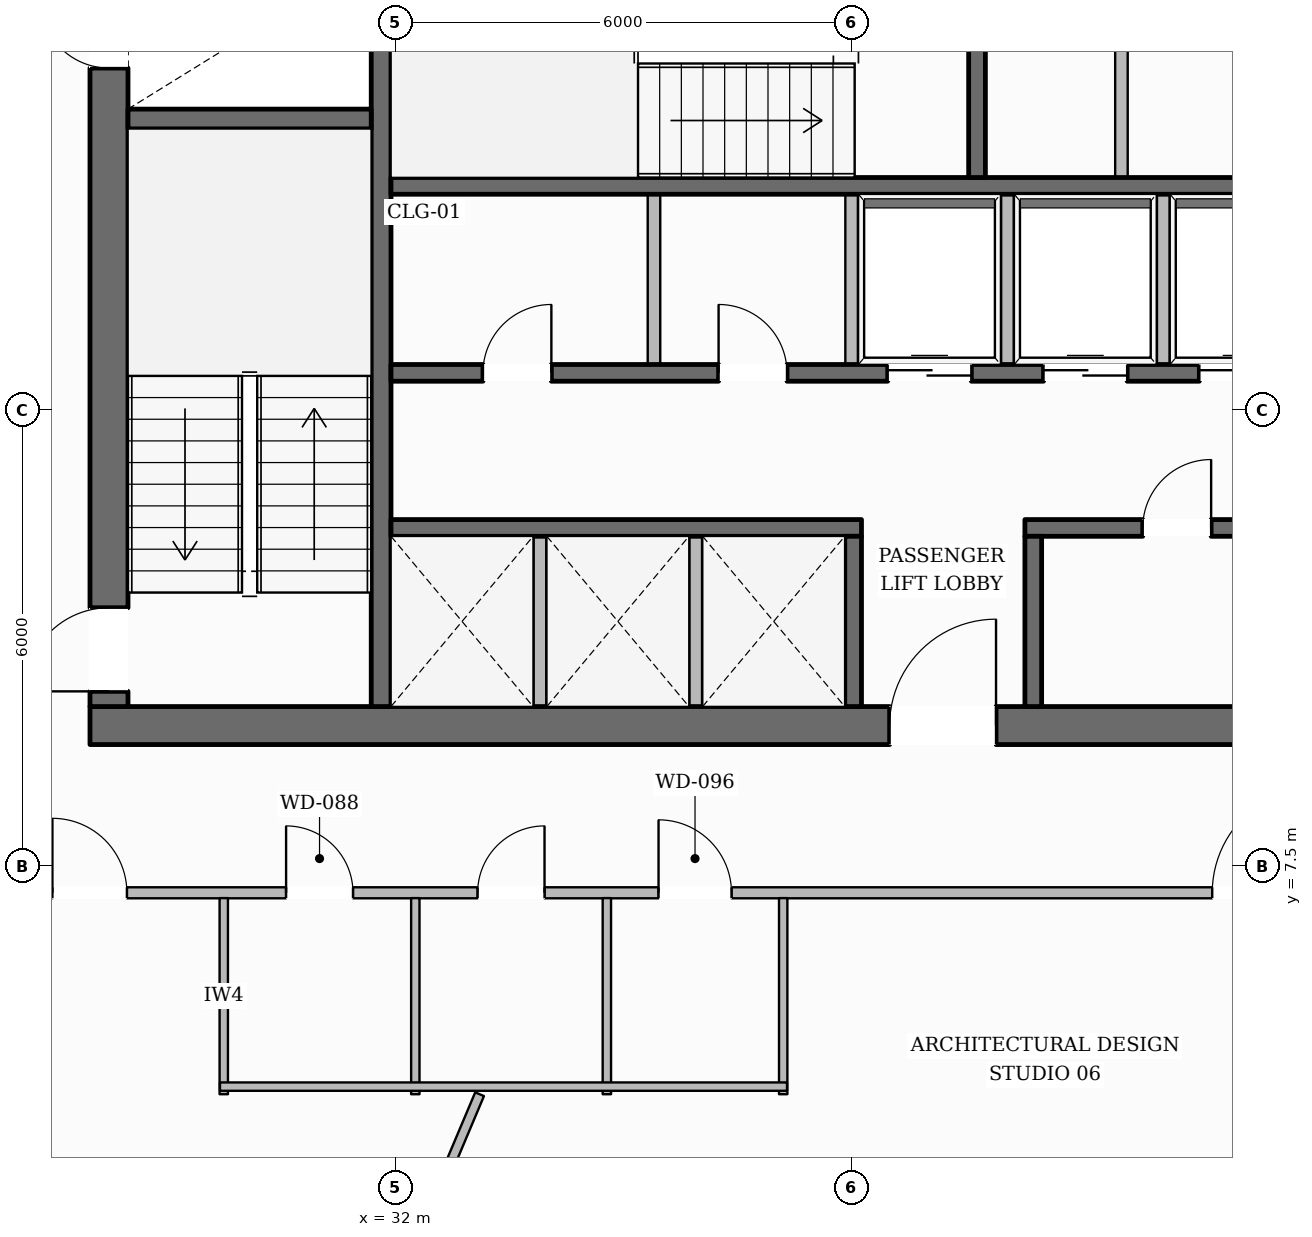
"""IFC4 building model, lengths in metres.
Left out: names, types, materials, properties, quantities, classifications, styles, units other than length and angle.
Written with IfcOpenShell. Run it as: python <this file> out.ifc"""

import sys

from ifc_helpers import new_model, si_unit, direction, frame, frame_2d, origin, place, context, subcontext, project, spatial, rectangle, extrude, element, fill, save


model = new_model("IFC4")
c1 = context("Model", 3, precision=1e-05, world=origin(), true_north=direction((0.0, 1.0)))
c2 = subcontext(c1, "Body", "Model", "MODEL_VIEW")
j1 = project(units=[si_unit("LENGTHUNIT", "METRE"), si_unit("PLANEANGLEUNIT", "RADIAN")], contexts=[c1])
p1 = place(None, origin())
s1 = spatial("IfcSite", under=j1, at=p1, CompositionType="ELEMENT")
p2 = place(p1, origin())
s2 = spatial("IfcBuilding", under=s1, at=p2, CompositionType="ELEMENT")
p3 = place(p2, frame((0.0, 0.0, 100.9)))
s3 = spatial("IfcBuildingStorey", under=s2, at=p3, CompositionType="ELEMENT", Elevation=100.9)
p4 = place(p3, frame((27.98, 9.35, 0.0), z_axis=(0.0, 0.0, 1.0), x_axis=(1.0, 0.0, 0.0)))
e1 = element("IfcWall", 1, at=p4, inside=s3, PredefinedType="SOLIDWALL", context=c2, shape_type="SweptSolid", body=[
    extrude(rectangle(XDim=20.04, YDim=0.5, at=frame_2d((10.02, 0.0))), origin(), (0.0, 0.0, 1.0), 3.6),
])
p5 = place(p4, frame((10.52, 0.0, 0.0)))
e2 = element("IfcOpeningElement", 2, at=p5, cuts=e1, PredefinedType="OPENING", context=c2, shape_type="SweptSolid", body=[
    extrude(rectangle(XDim=1.4, YDim=2.2, at=frame_2d((0.7, 1.1))), frame((0.0, 0.26, 0.0), z_axis=(0.0, -1.0, 0.0), x_axis=(1.0, 0.0, 0.0)), (0.0, 0.0, 1.0), 0.52),
])
p6 = place(p3, frame((28.23, 9.6, 0.0), z_axis=(0.0, 0.0, 1.0), x_axis=(0.0, 1.0, 0.0)))
e3 = element("IfcWall", 3, at=p6, inside=s3, PredefinedType="SOLIDWALL", context=c2, shape_type="SweptSolid", body=[
    extrude(rectangle(XDim=13.0, YDim=0.5, at=frame_2d((6.5, 0.0))), origin(), (0.0, 0.0, 1.0), 3.6),
])
p7 = place(p6, frame((0.2, 0.0, 0.0)))
e4 = element("IfcOpeningElement", 4, at=p7, cuts=e3, PredefinedType="OPENING", context=c2, shape_type="SweptSolid", body=[
    extrude(rectangle(XDim=1.1, YDim=2.15, at=frame_2d((0.55, 1.075))), frame((0.0, 0.26, 0.0), z_axis=(0.0, -1.0, 0.0), x_axis=(1.0, 0.0, 0.0)), (0.0, 0.0, 1.0), 0.52),
])
p8 = place(p6, frame((8.4, 0.0, 0.0)))
e5 = element("IfcOpeningElement", 5, at=p8, cuts=e3, PredefinedType="OPENING", context=c2, shape_type="SweptSolid", body=[
    extrude(rectangle(XDim=0.9, YDim=2.1, at=frame_2d((0.45, 1.05))), frame((0.0, 0.26, 0.0), z_axis=(0.0, -1.0, 0.0), x_axis=(1.0, 0.0, 0.0)), (0.0, 0.0, 1.0), 0.52),
])
p9 = place(p3, frame((31.81, 9.6, 0.0), z_axis=(0.0, 0.0, 1.0), x_axis=(0.0, 1.0, 0.0)))
e6 = element("IfcWall", 6, at=p9, inside=s3, PredefinedType="SHEAR", context=c2, shape_type="SweptSolid", body=[
    extrude(rectangle(XDim=13.0, YDim=0.26, at=frame_2d((6.5, 0.0))), origin(), (0.0, 0.0, 1.0), 3.6),
])
p10 = place(p9, frame((10.925, 0.0, 0.0)))
e7 = element("IfcOpeningElement", 7, at=p10, cuts=e6, PredefinedType="OPENING", context=c2, shape_type="SweptSolid", body=[
    extrude(rectangle(XDim=1.25, YDim=2.25, at=frame_2d((0.625, 1.125))), frame((0.0, 0.14, 0.0), z_axis=(0.0, -1.0, 0.0), x_axis=(1.0, 0.0, 0.0)), (0.0, 0.0, 1.0), 0.28),
])
p11 = place(p3, frame((28.48, 17.33, 0.0), z_axis=(0.0, 0.0, 1.0), x_axis=(1.0, 0.0, 0.0)))
e8 = element("IfcWall", 8, at=p11, inside=s3, PredefinedType="SHEAR", context=c2, shape_type="SweptSolid", body=[
    extrude(rectangle(XDim=3.2, YDim=0.26, at=frame_2d((1.6, 0.0))), origin(), (0.0, 0.0, 1.0), 3.6),
])
p12 = place(p3, frame((31.94, 16.45, 0.0), z_axis=(0.0, 0.0, 1.0), x_axis=(1.0, 0.0, 0.0)))
e9 = element("IfcWall", 9, at=p12, inside=s3, PredefinedType="SOLIDWALL", context=c2, shape_type="SweptSolid", body=[
    extrude(rectangle(XDim=12.12, YDim=0.22, at=frame_2d((6.06, 0.0))), origin(), (0.0, 0.0, 1.0), 3.6),
])
p13 = place(p3, frame((39.65, 16.56, 0.0), z_axis=(0.0, 0.0, 1.0), x_axis=(0.0, 1.0, 0.0)))
e10 = element("IfcWall", 10, at=p13, inside=s3, PredefinedType="SOLIDWALL", context=c2, shape_type="SweptSolid", body=[
    extrude(rectangle(XDim=3.2, YDim=0.22, at=frame_2d((1.6, 0.0))), origin(), (0.0, 0.0, 1.0), 3.6),
])
p14 = place(p3, frame((31.94, 13.99, 0.0), z_axis=(0.0, 0.0, 1.0), x_axis=(1.0, 0.0, 0.0)))
e11 = element("IfcWall", 11, at=p14, inside=s3, PredefinedType="SOLIDWALL", context=c2, shape_type="SweptSolid", body=[
    extrude(rectangle(XDim=12.12, YDim=0.22, at=frame_2d((6.06, 0.0))), origin(), (0.0, 0.0, 1.0), 3.6),
])
p15 = place(p14, frame((1.21, 0.0, 0.0)))
e12 = element("IfcOpeningElement", 12, at=p15, cuts=e11, PredefinedType="OPENING", context=c2, shape_type="SweptSolid", body=[
    extrude(rectangle(XDim=0.9, YDim=2.1, at=frame_2d((0.45, 1.05))), frame((0.0, 0.12, 0.0), z_axis=(0.0, -1.0, 0.0), x_axis=(1.0, 0.0, 0.0)), (0.0, 0.0, 1.0), 0.24),
])
p16 = place(p14, frame((4.31, 0.0, 0.0)))
e13 = element("IfcOpeningElement", 13, at=p16, cuts=e11, PredefinedType="OPENING", context=c2, shape_type="SweptSolid", body=[
    extrude(rectangle(XDim=0.9, YDim=2.1, at=frame_2d((0.45, 1.05))), frame((0.0, 0.12, 0.0), z_axis=(0.0, -1.0, 0.0), x_axis=(1.0, 0.0, 0.0)), (0.0, 0.0, 1.0), 0.24),
])
p17 = place(p14, frame((6.535, 0.0, 0.0)))
e14 = element("IfcOpeningElement", 14, at=p17, cuts=e11, PredefinedType="OPENING", context=c2, shape_type="SweptSolid", body=[
    extrude(rectangle(XDim=1.1, YDim=2.2, at=frame_2d((0.55, 1.1))), frame((0.0, 0.12, 0.0), z_axis=(0.0, -1.0, 0.0), x_axis=(1.0, 0.0, 0.0)), (0.0, 0.0, 1.0), 0.24),
])
p18 = place(p14, frame((8.585, 0.0, 0.0)))
e15 = element("IfcOpeningElement", 15, at=p18, cuts=e11, PredefinedType="OPENING", context=c2, shape_type="SweptSolid", body=[
    extrude(rectangle(XDim=1.1, YDim=2.2, at=frame_2d((0.55, 1.1))), frame((0.0, 0.12, 0.0), z_axis=(0.0, -1.0, 0.0), x_axis=(1.0, 0.0, 0.0)), (0.0, 0.0, 1.0), 0.24),
])
p19 = place(p14, frame((10.635, 0.0, 0.0)))
e16 = element("IfcOpeningElement", 16, at=p19, cuts=e11, PredefinedType="OPENING", context=c2, shape_type="SweptSolid", body=[
    extrude(rectangle(XDim=1.1, YDim=2.2, at=frame_2d((0.55, 1.1))), frame((0.0, 0.12, 0.0), z_axis=(0.0, -1.0, 0.0), x_axis=(1.0, 0.0, 0.0)), (0.0, 0.0, 1.0), 0.24),
])
p20 = place(p3, frame((31.94, 11.95, 0.0), z_axis=(0.0, 0.0, 1.0), x_axis=(1.0, 0.0, 0.0)))
e17 = element("IfcWall", 17, at=p20, inside=s3, PredefinedType="SOLIDWALL", context=c2, shape_type="SweptSolid", body=[
    extrude(rectangle(XDim=6.19, YDim=0.22, at=frame_2d((3.095, 0.0))), origin(), (0.0, 0.0, 1.0), 3.6),
])
p21 = place(p3, frame((40.28, 11.95, 0.0), z_axis=(0.0, 0.0, 1.0), x_axis=(1.0, 0.0, 0.0)))
e18 = element("IfcWall", 18, at=p21, inside=s3, PredefinedType="SOLIDWALL", context=c2, shape_type="SweptSolid", body=[
    extrude(rectangle(XDim=3.78, YDim=0.22, at=frame_2d((1.89, 0.0))), origin(), (0.0, 0.0, 1.0), 3.6),
])
p22 = place(p21, frame((1.55, 0.0, 0.0)))
e19 = element("IfcOpeningElement", 19, at=p22, cuts=e18, PredefinedType="OPENING", context=c2, shape_type="SweptSolid", body=[
    extrude(rectangle(XDim=0.9, YDim=2.1, at=frame_2d((0.45, 1.05))), frame((0.0, 0.12, 0.0), z_axis=(0.0, -1.0, 0.0), x_axis=(1.0, 0.0, 0.0)), (0.0, 0.0, 1.0), 0.24),
])
for number, where, z_axis, x_axis in (
    (20, (38.02, 9.6, 0.0), (0.0, 0.0, 1.0), (0.0, 1.0, 0.0)),
    (21, (40.39, 9.6, 0.0), (0.0, 0.0, 1.0), (0.0, 1.0, 0.0)),
):
    element("IfcWall", number, at=place(p3, frame(where, z_axis=z_axis, x_axis=x_axis)), inside=s3, PredefinedType="SOLIDWALL", context=c2, shape_type="SweptSolid", body=[
        extrude(rectangle(XDim=2.24, YDim=0.22, at=frame_2d((1.12, 0.0))), origin(), (0.0, 0.0, 1.0), 3.6),
    ])
p23 = place(p3, frame((14.155, 13.347, 0.0), z_axis=(0.0, 0.0, 1.0), x_axis=(0.493868426836, 0.869536644986, 0.0)))
e22 = element("IfcWall", 22, at=p23, inside=s3, PredefinedType="STANDARD", context=c2, shape_type="SweptSolid", body=[
    extrude(rectangle(XDim=36.121, YDim=0.38, at=frame_2d((18.061, 0.0))), origin(), (0.0, 0.0, 1.0), 3.059),
])
p24 = place(p23, frame((31.935, 0.0, 0.65)))
e23 = element("IfcOpeningElement", 23, at=p24, cuts=e22, PredefinedType="OPENING", context=c2, shape_type="SweptSolid", body=[
    extrude(rectangle(XDim=1.55, YDim=1.75, at=frame_2d((0.775, 0.875))), frame((0.0, 0.2, 0.0), z_axis=(0.0, -1.0, 0.0), x_axis=(1.0, 0.0, 0.0)), (0.0, 0.0, 1.0), 0.4),
])
p25 = place(p23, frame((26.073, 0.0, 0.65)))
e24 = element("IfcOpeningElement", 24, at=p25, cuts=e22, PredefinedType="OPENING", context=c2, shape_type="SweptSolid", body=[
    extrude(rectangle(XDim=1.55, YDim=1.75, at=frame_2d((0.775, 0.875))), frame((0.0, 0.2, 0.0), z_axis=(0.0, -1.0, 0.0), x_axis=(1.0, 0.0, 0.0)), (0.0, 0.0, 1.0), 0.4),
])
p26 = place(p23, frame((14.352, 0.0, 0.65)))
e25 = element("IfcOpeningElement", 25, at=p26, cuts=e22, PredefinedType="OPENING", context=c2, shape_type="SweptSolid", body=[
    extrude(rectangle(XDim=1.55, YDim=1.75, at=frame_2d((0.775, 0.875))), frame((0.0, 0.2, 0.0), z_axis=(0.0, -1.0, 0.0), x_axis=(1.0, 0.0, 0.0)), (0.0, 0.0, 1.0), 0.4),
])
p27 = place(p23, frame((8.491, 0.0, 0.65)))
e26 = element("IfcOpeningElement", 26, at=p27, cuts=e22, PredefinedType="OPENING", context=c2, shape_type="SweptSolid", body=[
    extrude(rectangle(XDim=1.55, YDim=1.75, at=frame_2d((0.775, 0.875))), frame((0.0, 0.2, 0.0), z_axis=(0.0, -1.0, 0.0), x_axis=(1.0, 0.0, 0.0)), (0.0, 0.0, 1.0), 0.4),
])
p28 = place(p23, frame((2.63, 0.0, 0.65)))
e27 = element("IfcOpeningElement", 27, at=p28, cuts=e22, PredefinedType="OPENING", context=c2, shape_type="SweptSolid", body=[
    extrude(rectangle(XDim=1.55, YDim=1.75, at=frame_2d((0.775, 0.875))), frame((0.0, 0.2, 0.0), z_axis=(0.0, -1.0, 0.0), x_axis=(1.0, 0.0, 0.0)), (0.0, 0.0, 1.0), 0.4),
])
for number, where, z_axis, x_axis in (
    (28, (33.9, 9.55, 0.0), (0.0, 0.0, 1.0), (0.0, 1.0, 0.0)),
    (29, (35.95, 9.55, 0.0), (0.0, 0.0, 1.0), (0.0, 1.0, 0.0)),
):
    element("IfcWall", number, at=place(p3, frame(where, z_axis=z_axis, x_axis=x_axis)), inside=s3, PredefinedType="PARTITIONING", context=c2, shape_type="SweptSolid", body=[
        extrude(rectangle(XDim=2.29, YDim=0.165, at=frame_2d((1.145, 0.0))), origin(), (0.0, 0.0, 1.0), 3.6),
    ])
for number, where, z_axis, x_axis in (
    (30, (38.0, 14.1, 0.0), (0.0, 0.0, 1.0), (0.0, 1.0, 0.0)),
    (31, (35.4, 14.1, 0.0), (0.0, 0.0, 1.0), (0.0, 1.0, 0.0)),
    (32, (40.05, 14.1, 0.0), (0.0, 0.0, 1.0), (0.0, 1.0, 0.0)),
    (33, (42.1, 14.1, 0.0), (0.0, 0.0, 1.0), (0.0, 1.0, 0.0)),
):
    element("IfcWall", number, at=place(p3, frame(where, z_axis=z_axis, x_axis=x_axis)), inside=s3, PredefinedType="PARTITIONING", context=c2, shape_type="SweptSolid", body=[
        extrude(rectangle(XDim=2.24, YDim=0.165, at=frame_2d((1.12, 0.0))), origin(), (0.0, 0.0, 1.0), 3.6),
    ])
p29 = place(p3, frame((41.55, 16.56, 0.0), z_axis=(0.0, 0.0, 1.0), x_axis=(0.0, 1.0, 0.0)))
e34 = element("IfcWall", 34, at=p29, inside=s3, PredefinedType="PARTITIONING", context=c2, shape_type="SweptSolid", body=[
    extrude(rectangle(XDim=3.2, YDim=0.165, at=frame_2d((1.6, 0.0))), origin(), (0.0, 0.0, 1.0), 3.6),
])
p30 = place(p3, frame((26.03, 7.15, 0.0), z_axis=(0.0, 0.0, 1.0), x_axis=(1.0, 0.0, 0.0)))
e35 = element("IfcWall", 35, at=p30, inside=s3, PredefinedType="PARTITIONING", context=c2, shape_type="SweptSolid", body=[
    extrude(rectangle(XDim=23.94, YDim=0.145, at=frame_2d((11.97, 0.0))), origin(), (0.0, 0.0, 1.0), 3.6),
])
p31 = place(p30, frame((4.53, 0.0, 0.0)))
e36 = element("IfcOpeningElement", 36, at=p31, cuts=e35, PredefinedType="OPENING", context=c2, shape_type="SweptSolid", body=[
    extrude(rectangle(XDim=0.88, YDim=2.1, at=frame_2d((0.44, 1.05))), frame((0.0, 0.083, 0.0), z_axis=(0.0, -1.0, 0.0), x_axis=(1.0, 0.0, 0.0)), (0.0, 0.0, 1.0), 0.165),
])
p32 = place(p30, frame((7.05, 0.0, 0.0)))
e37 = element("IfcOpeningElement", 37, at=p32, cuts=e35, PredefinedType="OPENING", context=c2, shape_type="SweptSolid", body=[
    extrude(rectangle(XDim=0.88, YDim=2.1, at=frame_2d((0.44, 1.05))), frame((0.0, 0.083, 0.0), z_axis=(0.0, -1.0, 0.0), x_axis=(1.0, 0.0, 0.0)), (0.0, 0.0, 1.0), 0.165),
])
p33 = place(p30, frame((9.43, 0.0, 0.0)))
e38 = element("IfcOpeningElement", 38, at=p33, cuts=e35, PredefinedType="OPENING", context=c2, shape_type="SweptSolid", body=[
    extrude(rectangle(XDim=0.96, YDim=2.1, at=frame_2d((0.48, 1.05))), frame((0.0, 0.083, 0.0), z_axis=(0.0, -1.0, 0.0), x_axis=(1.0, 0.0, 0.0)), (0.0, 0.0, 1.0), 0.165),
])
p34 = place(p30, frame((1.456, 0.0, 0.0)))
e39 = element("IfcOpeningElement", 39, at=p34, cuts=e35, PredefinedType="OPENING", context=c2, shape_type="SweptSolid", body=[
    extrude(rectangle(XDim=0.98, YDim=2.15, at=frame_2d((0.49, 1.075))), frame((0.0, 0.083, 0.0), z_axis=(0.0, -1.0, 0.0), x_axis=(1.0, 0.0, 0.0)), (0.0, 0.0, 1.0), 0.165),
])
p35 = place(p30, frame((16.714, 0.0, 0.0)))
e40 = element("IfcOpeningElement", 40, at=p35, cuts=e35, PredefinedType="OPENING", context=c2, shape_type="SweptSolid", body=[
    extrude(rectangle(XDim=1.4, YDim=2.2, at=frame_2d((0.7, 1.1))), frame((0.0, 0.083, 0.0), z_axis=(0.0, -1.0, 0.0), x_axis=(1.0, 0.0, 0.0)), (0.0, 0.0, 1.0), 0.165),
])
p36 = place(p3, frame((29.74, 4.5, 0.0), z_axis=(0.0, 0.0, 1.0), x_axis=(0.0, 1.0, 0.0)))
e41 = element("IfcWall", 41, at=p36, inside=s3, PredefinedType="PLUMBINGWALL", context=c2, shape_type="SweptSolid", body=[
    extrude(rectangle(XDim=2.58, YDim=0.11, at=frame_2d((1.29, 0.0))), origin(), (0.0, 0.0, 1.0), 3.6),
])
p37 = place(p3, frame((32.26, 4.5, 0.0), z_axis=(0.0, 0.0, 1.0), x_axis=(0.0, 1.0, 0.0)))
e42 = element("IfcWall", 42, at=p37, inside=s3, PredefinedType="PLUMBINGWALL", context=c2, shape_type="SweptSolid", body=[
    extrude(rectangle(XDim=2.58, YDim=0.11, at=frame_2d((1.29, 0.0))), origin(), (0.0, 0.0, 1.0), 3.141),
])
for number, where, z_axis, x_axis in (
    (43, (34.78, 4.5, 0.0), (0.0, 0.0, 1.0), (0.0, 1.0, 0.0)),
    (44, (37.1, 4.5, 0.0), (0.0, 0.0, 1.0), (0.0, 1.0, 0.0)),
):
    element("IfcWall", number, at=place(p3, frame(where, z_axis=z_axis, x_axis=x_axis)), inside=s3, PredefinedType="PLUMBINGWALL", context=c2, shape_type="SweptSolid", body=[
        extrude(rectangle(XDim=2.58, YDim=0.11, at=frame_2d((1.29, 0.0))), origin(), (0.0, 0.0, 1.0), 3.6),
    ])
p38 = place(p3, frame((29.69, 4.6, 0.0), z_axis=(0.0, 0.0, 1.0), x_axis=(1.0, 0.0, 0.0)))
e45 = element("IfcWall", 45, at=p38, inside=s3, PredefinedType="PLUMBINGWALL", context=c2, shape_type="SweptSolid", body=[
    extrude(rectangle(XDim=7.46, YDim=0.11, at=frame_2d((3.73, 0.0))), origin(), (0.0, 0.0, 1.0), 3.6),
])
p39 = place(p3, frame((33.106, 4.5, 0.0), z_axis=(0.0, 0.0, 1.0), x_axis=(-0.388819762507, -0.921313840276, 0.0)))
e46 = element("IfcWall", 46, at=p39, inside=s3, PredefinedType="PARTITIONING", context=c2, shape_type="SweptSolid", body=[
    extrude(rectangle(XDim=1.331, YDim=0.125, at=frame_2d((0.665, 0.0))), origin(), (0.0, 0.0, 1.0), 3.6),
])
p40 = place(p7, origin())
e47 = element("IfcDoor", 47, at=p40, inside=s3, OperationType="SINGLE_SWING_LEFT", PredefinedType="DOOR", context=c2, shape_type="SweptSolid", body=[
    extrude(rectangle(XDim=1.1, YDim=2.15, at=frame_2d((0.55, 1.075))), frame((0.0, 0.025, 0.0), z_axis=(0.0, -1.0, 0.0), x_axis=(1.0, 0.0, 0.0)), (0.0, 0.0, 1.0), 0.05),
])
fill(e4, e47)
p41 = place(p8, origin())
e48 = element("IfcDoor", 48, at=p41, inside=s3, OperationType="SINGLE_SWING_RIGHT", PredefinedType="DOOR", context=c2, shape_type="SweptSolid", body=[
    extrude(rectangle(XDim=0.9, YDim=2.1, at=frame_2d((0.45, 1.05))), frame((0.0, 0.025, 0.0), z_axis=(0.0, -1.0, 0.0), x_axis=(1.0, 0.0, 0.0)), (0.0, 0.0, 1.0), 0.05),
])
fill(e5, e48)
p42 = place(p5, origin())
e49 = element("IfcDoor", 49, at=p42, inside=s3, OperationType="SINGLE_SWING_RIGHT", PredefinedType="DOOR", context=c2, shape_type="SweptSolid", body=[
    extrude(rectangle(XDim=1.4, YDim=2.2, at=frame_2d((0.7, 1.1))), frame((0.0, 0.025, 0.0), z_axis=(0.0, -1.0, 0.0), x_axis=(1.0, 0.0, 0.0)), (0.0, 0.0, 1.0), 0.05),
])
fill(e2, e49)
p43 = place(p15, origin())
e50 = element("IfcDoor", 50, at=p43, inside=s3, OperationType="SINGLE_SWING_RIGHT", PredefinedType="DOOR", context=c2, shape_type="SweptSolid", body=[
    extrude(rectangle(XDim=0.9, YDim=2.1, at=frame_2d((0.45, 1.05))), frame((0.0, 0.025, 0.0), z_axis=(0.0, -1.0, 0.0), x_axis=(1.0, 0.0, 0.0)), (0.0, 0.0, 1.0), 0.05),
])
fill(e12, e50)
p44 = place(p16, origin())
e51 = element("IfcDoor", 51, at=p44, inside=s3, OperationType="SINGLE_SWING_LEFT", PredefinedType="DOOR", context=c2, shape_type="SweptSolid", body=[
    extrude(rectangle(XDim=0.9, YDim=2.1, at=frame_2d((0.45, 1.05))), frame((0.0, 0.025, 0.0), z_axis=(0.0, -1.0, 0.0), x_axis=(1.0, 0.0, 0.0)), (0.0, 0.0, 1.0), 0.05),
])
fill(e13, e51)
p45 = place(p17, origin())
e52 = element("IfcDoor", 52, at=p45, inside=s3, OperationType="DOUBLE_DOOR_SLIDING", PredefinedType="DOOR", context=c2, shape_type="SweptSolid", body=[
    extrude(rectangle(XDim=1.1, YDim=2.2, at=frame_2d((0.55, 1.1))), frame((0.0, 0.025, 0.0), z_axis=(0.0, -1.0, 0.0), x_axis=(1.0, 0.0, 0.0)), (0.0, 0.0, 1.0), 0.05),
])
fill(e14, e52)
p46 = place(p18, origin())
e53 = element("IfcDoor", 53, at=p46, inside=s3, OperationType="DOUBLE_DOOR_SLIDING", PredefinedType="DOOR", context=c2, shape_type="SweptSolid", body=[
    extrude(rectangle(XDim=1.1, YDim=2.2, at=frame_2d((0.55, 1.1))), frame((0.0, 0.025, 0.0), z_axis=(0.0, -1.0, 0.0), x_axis=(1.0, 0.0, 0.0)), (0.0, 0.0, 1.0), 0.05),
])
fill(e15, e53)
p47 = place(p19, origin())
e54 = element("IfcDoor", 54, at=p47, inside=s3, OperationType="DOUBLE_DOOR_SLIDING", PredefinedType="DOOR", context=c2, shape_type="SweptSolid", body=[
    extrude(rectangle(XDim=1.1, YDim=2.2, at=frame_2d((0.55, 1.1))), frame((0.0, 0.025, 0.0), z_axis=(0.0, -1.0, 0.0), x_axis=(1.0, 0.0, 0.0)), (0.0, 0.0, 1.0), 0.05),
])
fill(e16, e54)
p48 = place(p22, origin())
e55 = element("IfcDoor", 55, at=p48, inside=s3, OperationType="SINGLE_SWING_RIGHT", PredefinedType="DOOR", context=c2, shape_type="SweptSolid", body=[
    extrude(rectangle(XDim=0.9, YDim=2.1, at=frame_2d((0.45, 1.05))), frame((0.0, 0.025, 0.0), z_axis=(0.0, -1.0, 0.0), x_axis=(1.0, 0.0, 0.0)), (0.0, 0.0, 1.0), 0.05),
])
fill(e19, e55)
p49 = place(p31, origin())
e56 = element("IfcDoor", 56, at=p49, inside=s3, OperationType="SINGLE_SWING_LEFT", PredefinedType="DOOR", context=c2, shape_type="SweptSolid", body=[
    extrude(rectangle(XDim=0.88, YDim=2.1, at=frame_2d((0.44, 1.05))), frame((0.0, 0.025, 0.0), z_axis=(0.0, -1.0, 0.0), x_axis=(1.0, 0.0, 0.0)), (0.0, 0.0, 1.0), 0.05),
])
fill(e36, e56)
p50 = place(p32, origin())
e57 = element("IfcDoor", 57, at=p50, inside=s3, OperationType="SINGLE_SWING_RIGHT", PredefinedType="DOOR", context=c2, shape_type="SweptSolid", body=[
    extrude(rectangle(XDim=0.88, YDim=2.1, at=frame_2d((0.44, 1.05))), frame((0.0, 0.025, 0.0), z_axis=(0.0, -1.0, 0.0), x_axis=(1.0, 0.0, 0.0)), (0.0, 0.0, 1.0), 0.05),
])
fill(e37, e57)
p51 = place(p33, origin())
e58 = element("IfcDoor", 58, at=p51, inside=s3, OperationType="SINGLE_SWING_LEFT", PredefinedType="DOOR", context=c2, shape_type="SweptSolid", body=[
    extrude(rectangle(XDim=0.96, YDim=2.1, at=frame_2d((0.48, 1.05))), frame((0.0, 0.025, 0.0), z_axis=(0.0, -1.0, 0.0), x_axis=(1.0, 0.0, 0.0)), (0.0, 0.0, 1.0), 0.05),
])
fill(e38, e58)
p52 = place(p34, origin())
e59 = element("IfcDoor", 59, at=p52, inside=s3, OperationType="SINGLE_SWING_LEFT", PredefinedType="DOOR", context=c2, shape_type="SweptSolid", body=[
    extrude(rectangle(XDim=0.98, YDim=2.15, at=frame_2d((0.49, 1.075))), frame((0.0, 0.025, 0.0), z_axis=(0.0, -1.0, 0.0), x_axis=(1.0, 0.0, 0.0)), (0.0, 0.0, 1.0), 0.05),
])
fill(e39, e59)
p53 = place(p35, origin())
e60 = element("IfcDoor", 60, at=p53, inside=s3, OperationType="SINGLE_SWING_RIGHT", PredefinedType="DOOR", context=c2, shape_type="SweptSolid", body=[
    extrude(rectangle(XDim=1.4, YDim=2.2, at=frame_2d((0.7, 1.1))), frame((0.0, 0.025, 0.0), z_axis=(0.0, -1.0, 0.0), x_axis=(1.0, 0.0, 0.0)), (0.0, 0.0, 1.0), 0.05),
])
fill(e40, e60)
save(model, sys.argv[1])
